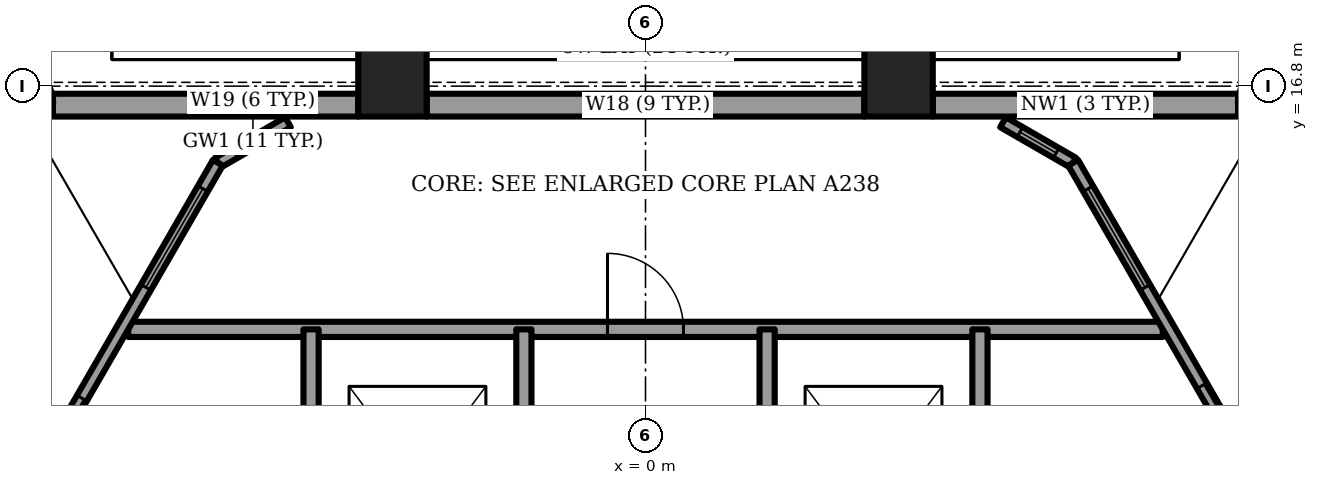
"""IFC4 building model, lengths in metres.
Left out: names, types, materials, properties, quantities, classifications, styles, units other than length and angle.
Written with IfcOpenShell. Run it as: python <this file> out.ifc"""

import sys

from ifc_helpers import new_model, si_unit, direction, frame, frame_2d, origin, origin_2d, place, context, subcontext, project, spatial, rectangle, circle, extrude, element, fill, save


model = new_model("IFC4")
c1 = context("Model", 3, precision=1e-05, world=origin(), true_north=direction((0.0, 1.0)))
c2 = subcontext(c1, "Body", "Model", "MODEL_VIEW")
j1 = project(units=[si_unit("LENGTHUNIT", "METRE"), si_unit("PLANEANGLEUNIT", "RADIAN")], contexts=[c1])
p1 = place(None, origin())
s1 = spatial("IfcSite", under=j1, at=p1, CompositionType="ELEMENT")
p2 = place(p1, origin())
s2 = spatial("IfcBuilding", under=s1, at=p2, CompositionType="ELEMENT")
p3 = place(p2, frame((0.0, 0.0, 267.5)))
s3 = spatial("IfcBuildingStorey", under=s2, at=p3, CompositionType="ELEMENT", Elevation=267.5)
for number, where, z_axis, x_axis in (
    (1, (-8.242, 16.589, -1.2), (0.0, 0.0, 1.0), (1.0, 0.0, 0.0)),
    (2, (8.242, 16.589, -1.2), (0.0, 0.0, 1.0), (1.0, 0.0, 0.0)),
):
    element("IfcColumn", number, at=place(p3, frame(where, z_axis=z_axis, x_axis=x_axis)), inside=s3, PredefinedType="COLUMN", context=c2, shape_type="SweptSolid", body=[
        extrude(circle(Radius=0.45, at=origin_2d()), origin(), (0.0, 0.0, 1.0), 3.75),
    ])
for number, where, z_axis, x_axis in (
    (3, (3.329, 16.85, -1.2), (0.0, 0.0, 1.0), (1.0, 0.0, 0.0)),
    (4, (-3.329, 16.85, -1.2), (0.0, 0.0, 1.0), (1.0, 0.0, 0.0)),
):
    element("IfcColumn", number, at=place(p3, frame(where, z_axis=z_axis, x_axis=x_axis)), inside=s3, PredefinedType="COLUMN", context=c2, shape_type="SweptSolid", body=[
        extrude(rectangle(XDim=0.9, YDim=0.9, at=origin_2d()), origin(), (0.0, 0.0, 1.0), 3.75),
    ])
p4 = place(p3, frame((7.796, 16.55, 0.0), z_axis=(0.0, 0.0, 1.0), x_axis=(-1.0, 0.0, 0.0)))
e5 = element("IfcWall", 5, at=p4, inside=s3, PredefinedType="SOLIDWALL", context=c2, shape_type="SweptSolid", body=[
    extrude(rectangle(XDim=4.017, YDim=0.3, at=frame_2d((2.008, 0.0))), origin(), (0.0, 0.0, 1.0), 2.55),
])
p5 = place(p3, frame((2.879, 16.55, 0.0), z_axis=(0.0, 0.0, 1.0), x_axis=(-1.0, 0.0, 0.0)))
e6 = element("IfcWall", 6, at=p5, inside=s3, PredefinedType="SOLIDWALL", context=c2, shape_type="SweptSolid", body=[
    extrude(rectangle(XDim=5.759, YDim=0.3, at=frame_2d((2.879, 0.0))), origin(), (0.0, 0.0, 1.0), 2.55),
])
p6 = place(p5, frame((2.4, 0.0, 0.15)))
e7 = element("IfcOpeningElement", 7, at=p6, cuts=e6, PredefinedType="OPENING", context=c2, shape_type="SweptSolid", body=[
    extrude(rectangle(XDim=0.9, YDim=2.15, at=frame_2d((0.45, 1.075))), frame((0.0, 0.15, 0.0), z_axis=(0.0, -1.0, 0.0), x_axis=(1.0, 0.0, 0.0)), (0.0, 0.0, 1.0), 0.3),
])
p7 = place(p3, frame((-3.779, 16.55, 0.0), z_axis=(0.0, 0.0, 1.0), x_axis=(-1.0, 0.0, 0.0)))
e8 = element("IfcWall", 8, at=p7, inside=s3, PredefinedType="SOLIDWALL", context=c2, shape_type="SweptSolid", body=[
    extrude(rectangle(XDim=4.017, YDim=0.3, at=frame_2d((2.008, 0.0))), origin(), (0.0, 0.0, 1.0), 2.55),
])
p8 = place(p3, frame((-5.626, 15.792, 0.0), z_axis=(0.0, 0.0, 1.0), x_axis=(-0.499998195608, -0.866026445548, 0.0)))
e9 = element("IfcWall", 9, at=p8, inside=s3, PredefinedType="SOLIDWALL", context=c2, shape_type="SweptSolid", body=[
    extrude(rectangle(XDim=18.956, YDim=0.15, at=frame_2d((9.478, 0.0))), origin(), (0.0, 0.0, 1.0), 3.45),
])
p9 = place(p8, frame((3.577, 0.0, 0.0)))
e10 = element("IfcOpeningElement", 10, at=p9, cuts=e9, PredefinedType="OPENING", context=c2, shape_type="SweptSolid", body=[
    extrude(rectangle(XDim=1.4, YDim=2.4, at=frame_2d((0.7, 1.2))), frame((0.0, 0.075, 0.0), z_axis=(0.0, -1.0, 0.0), x_axis=(1.0, 0.0, 0.0)), (0.0, 0.0, 1.0), 0.15),
])
p10 = place(p8, frame((9.62, 0.0, 0.15)))
e11 = element("IfcOpeningElement", 11, at=p10, cuts=e9, PredefinedType="OPENING", context=c2, shape_type="SweptSolid", body=[
    extrude(rectangle(XDim=0.9, YDim=2.85, at=frame_2d((0.45, 1.425))), frame((0.0, 0.075, 0.0), z_axis=(0.0, -1.0, 0.0), x_axis=(1.0, 0.0, 0.0)), (0.0, 0.0, 1.0), 0.15),
])
p11 = place(p8, frame((7.52, 0.0, 0.15)))
e12 = element("IfcOpeningElement", 12, at=p11, cuts=e9, PredefinedType="OPENING", context=c2, shape_type="SweptSolid", body=[
    extrude(rectangle(XDim=1.4, YDim=2.85, at=frame_2d((0.7, 1.425))), frame((0.0, 0.075, 0.0), z_axis=(0.0, -1.0, 0.0), x_axis=(1.0, 0.0, 0.0)), (0.0, 0.0, 1.0), 0.15),
])
p12 = place(p8, frame((11.164, 0.0, 0.15)))
e13 = element("IfcOpeningElement", 13, at=p12, cuts=e9, PredefinedType="OPENING", context=c2, shape_type="SweptSolid", body=[
    extrude(rectangle(XDim=1.5, YDim=2.85, at=frame_2d((0.75, 1.425))), frame((0.0, 0.075, 0.0), z_axis=(0.0, -1.0, 0.0), x_axis=(1.0, 0.0, 0.0)), (0.0, 0.0, 1.0), 0.15),
])
p13 = place(p8, frame((13.364, 0.0, 0.15)))
e14 = element("IfcOpeningElement", 14, at=p13, cuts=e9, PredefinedType="OPENING", context=c2, shape_type="SweptSolid", body=[
    extrude(rectangle(XDim=1.4, YDim=2.85, at=frame_2d((0.7, 1.425))), frame((0.0, 0.075, 0.0), z_axis=(0.0, -1.0, 0.0), x_axis=(1.0, 0.0, 0.0)), (0.0, 0.0, 1.0), 0.15),
])
p14 = place(p8, frame((0.394, 0.0, 0.15)))
e15 = element("IfcOpeningElement", 15, at=p14, cuts=e9, PredefinedType="OPENING", context=c2, shape_type="SweptSolid", body=[
    extrude(rectangle(XDim=1.5, YDim=2.73, at=frame_2d((0.75, 1.365))), frame((0.0, 0.075, 0.0), z_axis=(0.0, -1.0, 0.0), x_axis=(1.0, 0.0, 0.0)), (0.0, 0.0, 1.0), 0.15),
])
p15 = place(p8, frame((15.574, 0.0, 0.15)))
e16 = element("IfcOpeningElement", 16, at=p15, cuts=e9, PredefinedType="OPENING", context=c2, shape_type="SweptSolid", body=[
    extrude(rectangle(XDim=1.5, YDim=2.73, at=frame_2d((0.75, 1.365))), frame((0.0, 0.075, 0.0), z_axis=(0.0, -1.0, 0.0), x_axis=(1.0, 0.0, 0.0)), (0.0, 0.0, 1.0), 0.15),
])
p16 = place(p3, frame((15.104, -0.624, 0.0), z_axis=(0.0, 0.0, 1.0), x_axis=(-0.499998195608, 0.866026445548, 0.0)))
e17 = element("IfcWall", 17, at=p16, inside=s3, PredefinedType="SOLIDWALL", context=c2, shape_type="SweptSolid", body=[
    extrude(rectangle(XDim=18.956, YDim=0.15, at=frame_2d((9.478, 0.0))), origin(), (0.0, 0.0, 1.0), 3.45),
])
p17 = place(p16, frame((4.192, 0.0, 0.15)))
e18 = element("IfcOpeningElement", 18, at=p17, cuts=e17, PredefinedType="OPENING", context=c2, shape_type="SweptSolid", body=[
    extrude(rectangle(XDim=1.5, YDim=2.85, at=frame_2d((0.75, 1.425))), frame((0.0, 0.075, 0.0), z_axis=(0.0, -1.0, 0.0), x_axis=(1.0, 0.0, 0.0)), (0.0, 0.0, 1.0), 0.15),
])
p18 = place(p16, frame((6.392, 0.0, 0.15)))
e19 = element("IfcOpeningElement", 19, at=p18, cuts=e17, PredefinedType="OPENING", context=c2, shape_type="SweptSolid", body=[
    extrude(rectangle(XDim=1.4, YDim=2.85, at=frame_2d((0.7, 1.425))), frame((0.0, 0.075, 0.0), z_axis=(0.0, -1.0, 0.0), x_axis=(1.0, 0.0, 0.0)), (0.0, 0.0, 1.0), 0.15),
])
p19 = place(p16, frame((8.392, 0.0, 0.15)))
e20 = element("IfcOpeningElement", 20, at=p19, cuts=e17, PredefinedType="OPENING", context=c2, shape_type="SweptSolid", body=[
    extrude(rectangle(XDim=0.9, YDim=2.85, at=frame_2d((0.45, 1.425))), frame((0.0, 0.075, 0.0), z_axis=(0.0, -1.0, 0.0), x_axis=(1.0, 0.0, 0.0)), (0.0, 0.0, 1.0), 0.15),
])
p20 = place(p16, frame((10.592, 0.0, 0.15)))
e21 = element("IfcOpeningElement", 21, at=p20, cuts=e17, PredefinedType="OPENING", context=c2, shape_type="SweptSolid", body=[
    extrude(rectangle(XDim=1.4, YDim=2.85, at=frame_2d((0.7, 1.425))), frame((0.0, 0.075, 0.0), z_axis=(0.0, -1.0, 0.0), x_axis=(1.0, 0.0, 0.0)), (0.0, 0.0, 1.0), 0.15),
])
p21 = place(p16, frame((14.168, 0.0, 0.0)))
e22 = element("IfcOpeningElement", 22, at=p21, cuts=e17, PredefinedType="OPENING", context=c2, shape_type="SweptSolid", body=[
    extrude(rectangle(XDim=1.4, YDim=2.4, at=frame_2d((0.7, 1.2))), frame((0.0, 0.075, 0.0), z_axis=(0.0, -1.0, 0.0), x_axis=(1.0, 0.0, 0.0)), (0.0, 0.0, 1.0), 0.15),
])
p22 = place(p16, frame((0.998, 0.0, 0.15)))
e23 = element("IfcOpeningElement", 23, at=p22, cuts=e17, PredefinedType="OPENING", context=c2, shape_type="SweptSolid", body=[
    extrude(rectangle(XDim=1.5, YDim=2.73, at=frame_2d((0.75, 1.365))), frame((0.0, 0.075, 0.0), z_axis=(0.0, -1.0, 0.0), x_axis=(1.0, 0.0, 0.0)), (0.0, 0.0, 1.0), 0.15),
])
p23 = place(p16, frame((17.062, 0.0, 0.15)))
e24 = element("IfcOpeningElement", 24, at=p23, cuts=e17, PredefinedType="OPENING", context=c2, shape_type="SweptSolid", body=[
    extrude(rectangle(XDim=1.5, YDim=2.73, at=frame_2d((0.75, 1.365))), frame((0.0, 0.075, 0.0), z_axis=(0.0, -1.0, 0.0), x_axis=(1.0, 0.0, 0.0)), (0.0, 0.0, 1.0), 0.15),
])
p24 = place(p3, frame((-4.704, 16.325, 0.0), z_axis=(0.0, 0.0, 1.0), x_axis=(-0.866048165231, -0.499960573946, 0.0)))
e25 = element("IfcWall", 25, at=p24, inside=s3, PredefinedType="SOLIDWALL", context=c2, shape_type="SweptSolid", body=[
    extrude(rectangle(XDim=1.065, YDim=0.15, at=frame_2d((0.532, 0.0))), origin(), (0.0, 0.0, 1.0), 3.45),
])
p25 = place(p24, frame((0.258, 0.0, 0.15)))
e26 = element("IfcOpeningElement", 26, at=p25, cuts=e25, PredefinedType="OPENING", context=c2, shape_type="SweptSolid", body=[
    extrude(rectangle(XDim=0.55, YDim=2.85, at=frame_2d((0.275, 1.425))), frame((0.0, 0.075, 0.0), z_axis=(0.0, -1.0, 0.0), x_axis=(1.0, 0.0, 0.0)), (0.0, 0.0, 1.0), 0.15),
])
p26 = place(p3, frame((5.626, 15.792, 0.0), z_axis=(0.0, 0.0, 1.0), x_axis=(-0.866048165231, 0.499960573946, 0.0)))
e27 = element("IfcWall", 27, at=p26, inside=s3, PredefinedType="SOLIDWALL", context=c2, shape_type="SweptSolid", body=[
    extrude(rectangle(XDim=1.065, YDim=0.15, at=frame_2d((0.532, 0.0))), origin(), (0.0, 0.0, 1.0), 3.45),
])
p27 = place(p26, frame((0.258, 0.0, 0.15)))
e28 = element("IfcOpeningElement", 28, at=p27, cuts=e27, PredefinedType="OPENING", context=c2, shape_type="SweptSolid", body=[
    extrude(rectangle(XDim=0.55, YDim=2.85, at=frame_2d((0.275, 1.425))), frame((0.0, 0.075, 0.0), z_axis=(0.0, -1.0, 0.0), x_axis=(1.0, 0.0, 0.0)), (0.0, 0.0, 1.0), 0.15),
])
p28 = place(p3, frame((-6.805, 13.6, 0.0), z_axis=(0.0, 0.0, 1.0), x_axis=(1.0, 0.0, 0.0)))
e29 = element("IfcWall", 29, at=p28, inside=s3, PredefinedType="PARTITIONING", context=c2, shape_type="SweptSolid", body=[
    extrude(rectangle(XDim=13.611, YDim=0.2, at=frame_2d((6.805, 0.0))), origin(), (0.0, 0.0, 1.0), 3.45),
])
p29 = place(p28, frame((6.305, 0.0, 0.0)))
e30 = element("IfcOpeningElement", 30, at=p29, cuts=e29, PredefinedType="OPENING", context=c2, shape_type="SweptSolid", body=[
    extrude(rectangle(XDim=1.0, YDim=2.1, at=frame_2d((0.5, 1.05))), frame((0.0, 0.1, 0.0), z_axis=(0.0, -1.0, 0.0), x_axis=(1.0, 0.0, 0.0)), (0.0, 0.0, 1.0), 0.2),
])
p30 = place(p3, frame((-4.4, 9.7, 0.0), z_axis=(0.0, 0.0, 1.0), x_axis=(0.0, 1.0, 0.0)))
e31 = element("IfcWall", 31, at=p30, inside=s3, PredefinedType="PARTITIONING", context=c2, shape_type="SweptSolid", body=[
    extrude(rectangle(XDim=3.9, YDim=0.2, at=frame_2d((1.95, 0.0))), origin(), (0.0, 0.0, 1.0), 3.45),
])
p31 = place(p30, frame((1.35, 0.0, 0.0)))
e32 = element("IfcOpeningElement", 32, at=p31, cuts=e31, PredefinedType="OPENING", context=c2, shape_type="SweptSolid", body=[
    extrude(rectangle(XDim=1.2, YDim=2.1, at=frame_2d((0.6, 1.05))), frame((0.0, 0.1, 0.0), z_axis=(0.0, -1.0, 0.0), x_axis=(1.0, 0.0, 0.0)), (0.0, 0.0, 1.0), 0.2),
])
p32 = place(p3, frame((4.4, 9.7, 0.0), z_axis=(0.0, 0.0, 1.0), x_axis=(0.0, 1.0, 0.0)))
e33 = element("IfcWall", 33, at=p32, inside=s3, PredefinedType="PARTITIONING", context=c2, shape_type="SweptSolid", body=[
    extrude(rectangle(XDim=3.9, YDim=0.2, at=frame_2d((1.95, 0.0))), origin(), (0.0, 0.0, 1.0), 3.45),
])
p33 = place(p32, frame((1.35, 0.0, 0.0)))
e34 = element("IfcOpeningElement", 34, at=p33, cuts=e33, PredefinedType="OPENING", context=c2, shape_type="SweptSolid", body=[
    extrude(rectangle(XDim=1.2, YDim=2.1, at=frame_2d((0.6, 1.05))), frame((0.0, 0.1, 0.0), z_axis=(0.0, -1.0, 0.0), x_axis=(1.0, 0.0, 0.0)), (0.0, 0.0, 1.0), 0.2),
])
for number, where, z_axis, x_axis in (
    (35, (-1.6, 9.7, 0.0), (0.0, 0.0, 1.0), (0.0, 1.0, 0.0)),
    (36, (1.6, 9.7, 0.0), (0.0, 0.0, 1.0), (0.0, 1.0, 0.0)),
):
    element("IfcWall", number, at=place(p3, frame(where, z_axis=z_axis, x_axis=x_axis)), inside=s3, PredefinedType="PARTITIONING", context=c2, shape_type="SweptSolid", body=[
        extrude(rectangle(XDim=3.9, YDim=0.2, at=frame_2d((1.95, 0.0))), origin(), (0.0, 0.0, 1.0), 3.45),
    ])
p34 = place(p6, origin())
e37 = element("IfcWindow", 37, at=p34, inside=s3, PartitioningType="SINGLE_PANEL", PredefinedType="WINDOW", context=c2, shape_type="SweptSolid", body=[
    extrude(rectangle(XDim=0.9, YDim=2.15, at=frame_2d((0.45, 1.075))), frame((0.0, 0.03, 0.0), z_axis=(0.0, -1.0, 0.0), x_axis=(1.0, 0.0, 0.0)), (0.0, 0.0, 1.0), 0.06),
])
fill(e7, e37)
p35 = place(p9, origin())
e38 = element("IfcDoor", 38, at=p35, inside=s3, OperationType="SLIDING_TO_LEFT", PredefinedType="DOOR", context=c2, shape_type="SweptSolid", body=[
    extrude(rectangle(XDim=1.4, YDim=2.4, at=frame_2d((0.7, 1.2))), frame((0.0, 0.025, 0.0), z_axis=(0.0, -1.0, 0.0), x_axis=(1.0, 0.0, 0.0)), (0.0, 0.0, 1.0), 0.05),
])
fill(e10, e38)
p36 = place(p14, origin())
e39 = element("IfcWindow", 39, at=p36, inside=s3, PartitioningType="SINGLE_PANEL", PredefinedType="WINDOW", context=c2, shape_type="SweptSolid", body=[
    extrude(rectangle(XDim=1.5, YDim=2.73, at=frame_2d((0.75, 1.365))), frame((0.0, 0.03, 0.0), z_axis=(0.0, -1.0, 0.0), x_axis=(1.0, 0.0, 0.0)), (0.0, 0.0, 1.0), 0.06),
])
fill(e15, e39)
p37 = place(p21, origin())
e40 = element("IfcDoor", 40, at=p37, inside=s3, OperationType="SLIDING_TO_RIGHT", PredefinedType="DOOR", context=c2, shape_type="SweptSolid", body=[
    extrude(rectangle(XDim=1.4, YDim=2.4, at=frame_2d((0.7, 1.2))), frame((0.0, 0.025, 0.0), z_axis=(0.0, -1.0, 0.0), x_axis=(1.0, 0.0, 0.0)), (0.0, 0.0, 1.0), 0.05),
])
fill(e22, e40)
p38 = place(p23, origin())
e41 = element("IfcWindow", 41, at=p38, inside=s3, PartitioningType="SINGLE_PANEL", PredefinedType="WINDOW", context=c2, shape_type="SweptSolid", body=[
    extrude(rectangle(XDim=1.5, YDim=2.73, at=frame_2d((0.75, 1.365))), frame((0.0, 0.03, 0.0), z_axis=(0.0, -1.0, 0.0), x_axis=(1.0, 0.0, 0.0)), (0.0, 0.0, 1.0), 0.06),
])
fill(e24, e41)
p39 = place(p25, origin())
e42 = element("IfcWindow", 42, at=p39, inside=s3, PartitioningType="SINGLE_PANEL", PredefinedType="WINDOW", context=c2, shape_type="SweptSolid", body=[
    extrude(rectangle(XDim=0.55, YDim=2.85, at=frame_2d((0.275, 1.425))), frame((0.0, 0.03, 0.0), z_axis=(0.0, -1.0, 0.0), x_axis=(1.0, 0.0, 0.0)), (0.0, 0.0, 1.0), 0.06),
])
fill(e26, e42)
p40 = place(p27, origin())
e43 = element("IfcWindow", 43, at=p40, inside=s3, PartitioningType="SINGLE_PANEL", PredefinedType="WINDOW", context=c2, shape_type="SweptSolid", body=[
    extrude(rectangle(XDim=0.55, YDim=2.85, at=frame_2d((0.275, 1.425))), frame((0.0, 0.03, 0.0), z_axis=(0.0, -1.0, 0.0), x_axis=(1.0, 0.0, 0.0)), (0.0, 0.0, 1.0), 0.06),
])
fill(e28, e43)
p41 = place(p29, origin())
e44 = element("IfcDoor", 44, at=p41, inside=s3, OperationType="SINGLE_SWING_LEFT", PredefinedType="DOOR", context=c2, shape_type="SweptSolid", body=[
    extrude(rectangle(XDim=1.0, YDim=2.1, at=frame_2d((0.5, 1.05))), frame((0.0, 0.025, 0.0), z_axis=(0.0, -1.0, 0.0), x_axis=(1.0, 0.0, 0.0)), (0.0, 0.0, 1.0), 0.05),
])
fill(e30, e44)
save(model, sys.argv[1])
